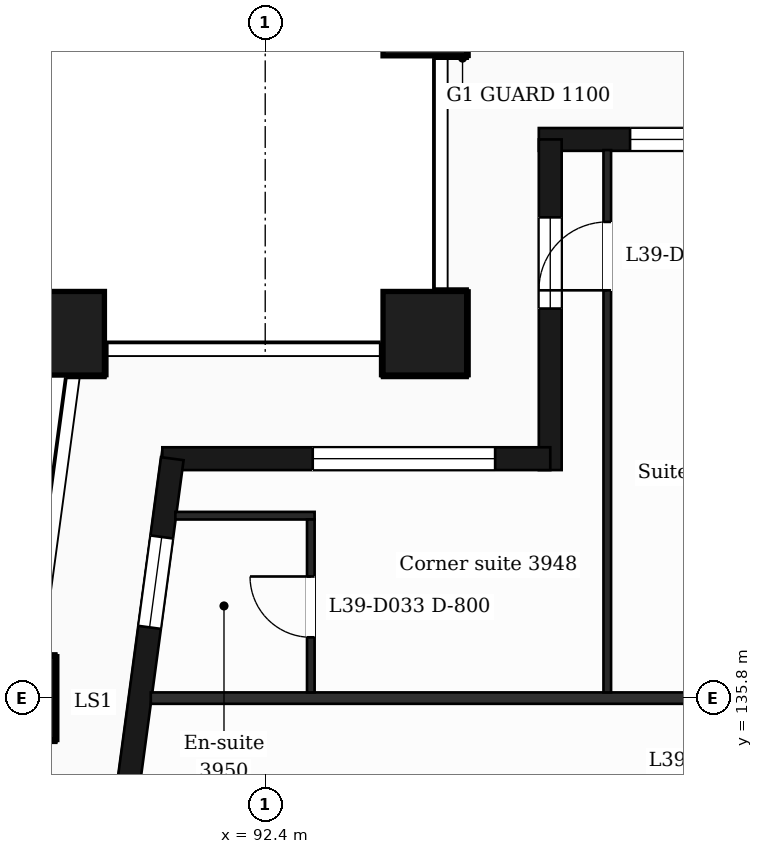
"""IFC4 building model, lengths in metres.
Left out: names, types, materials, properties, quantities, classifications, styles, units other than length and angle.
Written with IfcOpenShell. Run it as: python <this file> out.ifc"""

import sys

from ifc_helpers import new_model, si_unit, direction, frame, frame_2d, origin, origin_2d, place, context, subcontext, project, spatial, rectangle, extrude, element, fill, save


model = new_model("IFC4")
c1 = context("Model", 3, precision=1e-05, world=origin(), true_north=direction((0.0, 1.0)))
c2 = subcontext(c1, "Body", "Model", "MODEL_VIEW")
j1 = project(units=[si_unit("LENGTHUNIT", "METRE"), si_unit("PLANEANGLEUNIT", "RADIAN")], contexts=[c1])
p1 = place(None, origin())
s1 = spatial("IfcSite", under=j1, at=p1, CompositionType="ELEMENT")
p2 = place(p1, origin())
s2 = spatial("IfcBuilding", under=s1, at=p2, CompositionType="ELEMENT")
p3 = place(p2, frame((0.0, 0.0, 166.3)))
s3 = spatial("IfcBuildingStorey", under=s2, at=p3, CompositionType="ELEMENT", Elevation=166.3)
for number, where, z_axis, x_axis in (
    (1, (94.5, 140.6, 0.0), (0.0, 0.0, 1.0), (1.0, 0.0, 0.0)),
    (2, (89.735, 140.6, 0.0), (0.0, 0.0, 1.0), (1.0, 0.0, 0.0)),
    (3, (89.088, 135.8, 0.0), (0.0, 0.0, 1.0), (1.0, 0.0, 0.0)),
    (4, (94.5, 144.8, 0.0), (0.0, 0.0, 1.0), (1.0, 0.0, 0.0)),
):
    element("IfcColumn", number, at=place(p3, frame(where, z_axis=z_axis, x_axis=x_axis)), inside=s3, PredefinedType="COLUMN", context=c2, shape_type="SweptSolid", body=[
        extrude(rectangle(XDim=1.1, YDim=1.1, at=origin_2d()), origin(), (0.0, 0.0, 1.0), 3.7),
    ])
p4 = place(p3, frame((112.5, 143.15, 0.0), z_axis=(0.0, 0.0, 1.0), x_axis=(-1.0, 0.0, 0.0)))
e5 = element("IfcWall", 5, at=p4, inside=s3, PredefinedType="SOLIDWALL", context=c2, shape_type="SweptSolid", body=[
    extrude(rectangle(XDim=16.5, YDim=0.3, at=frame_2d((8.25, 0.0))), origin(), (0.0, 0.0, 1.0), 3.38),
])
p5 = place(p4, frame((1.1, 0.0, 0.9)))
e6 = element("IfcOpeningElement", 6, at=p5, cuts=e5, PredefinedType="OPENING", context=c2, shape_type="SweptSolid", body=[
    extrude(rectangle(XDim=1.2, YDim=2.1, at=frame_2d((0.6, 1.05))), frame((0.0, 0.16, 0.0), z_axis=(0.0, -1.0, 0.0), x_axis=(1.0, 0.0, 0.0)), (0.0, 0.0, 1.0), 0.32),
])
p6 = place(p4, frame((4.2, 0.0, 0.9)))
e7 = element("IfcOpeningElement", 7, at=p6, cuts=e5, PredefinedType="OPENING", context=c2, shape_type="SweptSolid", body=[
    extrude(rectangle(XDim=2.4, YDim=2.1, at=frame_2d((1.2, 1.05))), frame((0.0, 0.16, 0.0), z_axis=(0.0, -1.0, 0.0), x_axis=(1.0, 0.0, 0.0)), (0.0, 0.0, 1.0), 0.32),
])
p7 = place(p4, frame((8.4, 0.0, 0.9)))
e8 = element("IfcOpeningElement", 8, at=p7, cuts=e5, PredefinedType="OPENING", context=c2, shape_type="SweptSolid", body=[
    extrude(rectangle(XDim=2.4, YDim=2.1, at=frame_2d((1.2, 1.05))), frame((0.0, 0.16, 0.0), z_axis=(0.0, -1.0, 0.0), x_axis=(1.0, 0.0, 0.0)), (0.0, 0.0, 1.0), 0.32),
])
p8 = place(p4, frame((12.3, 0.0, 0.0)))
e9 = element("IfcOpeningElement", 9, at=p8, cuts=e5, PredefinedType="OPENING", context=c2, shape_type="SweptSolid", body=[
    extrude(rectangle(XDim=1.2, YDim=2.4, at=frame_2d((0.6, 1.2))), frame((0.0, 0.16, 0.0), z_axis=(0.0, -1.0, 0.0), x_axis=(1.0, 0.0, 0.0)), (0.0, 0.0, 1.0), 0.32),
])
p9 = place(p4, frame((14.1, 0.0, 0.9)))
e10 = element("IfcOpeningElement", 10, at=p9, cuts=e5, PredefinedType="OPENING", context=c2, shape_type="SweptSolid", body=[
    extrude(rectangle(XDim=1.2, YDim=2.1, at=frame_2d((0.6, 1.05))), frame((0.0, 0.16, 0.0), z_axis=(0.0, -1.0, 0.0), x_axis=(1.0, 0.0, 0.0)), (0.0, 0.0, 1.0), 0.32),
])
p10 = place(p3, frame((96.15, 143.15, 0.0), z_axis=(0.0, 0.0, 1.0), x_axis=(0.0, -1.0, 0.0)))
e11 = element("IfcWall", 11, at=p10, inside=s3, PredefinedType="SOLIDWALL", context=c2, shape_type="SweptSolid", body=[
    extrude(rectangle(XDim=4.35, YDim=0.3, at=frame_2d((2.175, 0.0))), origin(), (0.0, 0.0, 1.0), 3.38),
])
p11 = place(p10, frame((1.025, 0.0, 0.9)))
e12 = element("IfcOpeningElement", 12, at=p11, cuts=e11, PredefinedType="OPENING", context=c2, shape_type="SweptSolid", body=[
    extrude(rectangle(XDim=1.2, YDim=2.1, at=frame_2d((0.6, 1.05))), frame((0.0, 0.16, 0.0), z_axis=(0.0, -1.0, 0.0), x_axis=(1.0, 0.0, 0.0)), (0.0, 0.0, 1.0), 0.32),
])
p12 = place(p3, frame((96.15, 138.95, 0.0), z_axis=(0.0, 0.0, 1.0), x_axis=(-1.0, 0.0, 0.0)))
e13 = element("IfcWall", 13, at=p12, inside=s3, PredefinedType="SOLIDWALL", context=c2, shape_type="SweptSolid", body=[
    extrude(rectangle(XDim=5.104, YDim=0.3, at=frame_2d((2.552, 0.0))), origin(), (0.0, 0.0, 1.0), 3.38),
])
p13 = place(p12, frame((0.725, 0.0, 0.9)))
e14 = element("IfcOpeningElement", 14, at=p13, cuts=e13, PredefinedType="OPENING", context=c2, shape_type="SweptSolid", body=[
    extrude(rectangle(XDim=2.4, YDim=2.1, at=frame_2d((1.2, 1.05))), frame((0.0, 0.16, 0.0), z_axis=(0.0, -1.0, 0.0), x_axis=(1.0, 0.0, 0.0)), (0.0, 0.0, 1.0), 0.32),
])
p14 = place(p3, frame((91.177, 138.95, 0.0), z_axis=(0.0, 0.0, 1.0), x_axis=(-0.133426664613, -0.991058689065, 0.0)))
e15 = element("IfcWall", 15, at=p14, inside=s3, PredefinedType="SOLIDWALL", context=c2, shape_type="SweptSolid", body=[
    extrude(rectangle(XDim=6.609, YDim=0.3, at=frame_2d((3.305, 0.0))), origin(), (0.0, 0.0, 1.0), 3.38),
])
p15 = place(p14, frame((1.039, 0.0, 0.9)))
e16 = element("IfcOpeningElement", 16, at=p15, cuts=e15, PredefinedType="OPENING", context=c2, shape_type="SweptSolid", body=[
    extrude(rectangle(XDim=1.2, YDim=2.1, at=frame_2d((0.6, 1.05))), frame((0.0, 0.16, 0.0), z_axis=(0.0, -1.0, 0.0), x_axis=(1.0, 0.0, 0.0)), (0.0, 0.0, 1.0), 0.32),
])
p16 = place(p14, frame((4.294, 0.0, 0.0)))
e17 = element("IfcOpeningElement", 17, at=p16, cuts=e15, PredefinedType="OPENING", context=c2, shape_type="SweptSolid", body=[
    extrude(rectangle(XDim=1.2, YDim=2.4, at=frame_2d((0.6, 1.2))), frame((0.0, 0.16, 0.0), z_axis=(0.0, -1.0, 0.0), x_axis=(1.0, 0.0, 0.0)), (0.0, 0.0, 1.0), 0.32),
])
p17 = place(p3, frame((90.895, 135.8, 0.0), z_axis=(0.0, 0.0, 1.0), x_axis=(1.0, 0.0, 0.0)))
e18 = element("IfcWall", 18, at=p17, inside=s3, PredefinedType="PARTITIONING", context=c2, shape_type="SweptSolid", body=[
    extrude(rectangle(XDim=45.011, YDim=0.15, at=frame_2d((22.505, 0.0))), origin(), (0.0, 0.0, 1.0), 3.38),
])
p18 = place(p17, frame((7.675, 0.0, 0.0)))
e19 = element("IfcOpeningElement", 19, at=p18, cuts=e18, PredefinedType="OPENING", context=c2, shape_type="SweptSolid", body=[
    extrude(rectangle(XDim=1.0, YDim=2.1, at=frame_2d((0.5, 1.05))), frame((0.0, 0.085, 0.0), z_axis=(0.0, -1.0, 0.0), x_axis=(1.0, 0.0, 0.0)), (0.0, 0.0, 1.0), 0.17),
])
p19 = place(p17, frame((11.505, 0.0, 0.0)))
e20 = element("IfcOpeningElement", 20, at=p19, cuts=e18, PredefinedType="OPENING", context=c2, shape_type="SweptSolid", body=[
    extrude(rectangle(XDim=1.0, YDim=2.1, at=frame_2d((0.5, 1.05))), frame((0.0, 0.085, 0.0), z_axis=(0.0, -1.0, 0.0), x_axis=(1.0, 0.0, 0.0)), (0.0, 0.0, 1.0), 0.17),
])
p20 = place(p17, frame((24.865, 0.0, 0.0)))
e21 = element("IfcOpeningElement", 21, at=p20, cuts=e18, PredefinedType="OPENING", context=c2, shape_type="SweptSolid", body=[
    extrude(rectangle(XDim=1.0, YDim=2.1, at=frame_2d((0.5, 1.05))), frame((0.0, 0.085, 0.0), z_axis=(0.0, -1.0, 0.0), x_axis=(1.0, 0.0, 0.0)), (0.0, 0.0, 1.0), 0.17),
])
p21 = place(p17, frame((31.18, 0.0, 0.0)))
e22 = element("IfcOpeningElement", 22, at=p21, cuts=e18, PredefinedType="OPENING", context=c2, shape_type="SweptSolid", body=[
    extrude(rectangle(XDim=0.95, YDim=2.1, at=frame_2d((0.475, 1.05))), frame((0.0, 0.085, 0.0), z_axis=(0.0, -1.0, 0.0), x_axis=(1.0, 0.0, 0.0)), (0.0, 0.0, 1.0), 0.17),
])
p22 = place(p17, frame((36.335, 0.0, 0.0)))
e23 = element("IfcOpeningElement", 23, at=p22, cuts=e18, PredefinedType="OPENING", context=c2, shape_type="SweptSolid", body=[
    extrude(rectangle(XDim=1.0, YDim=2.1, at=frame_2d((0.5, 1.05))), frame((0.0, 0.085, 0.0), z_axis=(0.0, -1.0, 0.0), x_axis=(1.0, 0.0, 0.0)), (0.0, 0.0, 1.0), 0.17),
])
p23 = place(p3, frame((91.218, 138.2, 0.0), z_axis=(0.0, 0.0, 1.0), x_axis=(1.0, 0.0, 0.0)))
e24 = element("IfcWall", 24, at=p23, inside=s3, PredefinedType="PARTITIONING", context=c2, shape_type="SweptSolid", body=[
    extrude(rectangle(XDim=1.832, YDim=0.1, at=frame_2d((0.916, 0.0))), origin(), (0.0, 0.0, 1.0), 3.38),
])
p24 = place(p3, frame((93.0, 135.875, 0.0), z_axis=(0.0, 0.0, 1.0), x_axis=(0.0, 1.0, 0.0)))
e25 = element("IfcWall", 25, at=p24, inside=s3, PredefinedType="PARTITIONING", context=c2, shape_type="SweptSolid", body=[
    extrude(rectangle(XDim=2.275, YDim=0.1, at=frame_2d((1.137, 0.0))), origin(), (0.0, 0.0, 1.0), 3.38),
])
p25 = place(p24, frame((0.725, 0.0, 0.0)))
e26 = element("IfcOpeningElement", 26, at=p25, cuts=e25, PredefinedType="OPENING", context=c2, shape_type="SweptSolid", body=[
    extrude(rectangle(XDim=0.8, YDim=2.1, at=frame_2d((0.4, 1.05))), frame((0.0, 0.06, 0.0), z_axis=(0.0, -1.0, 0.0), x_axis=(1.0, 0.0, 0.0)), (0.0, 0.0, 1.0), 0.12),
])
p26 = place(p3, frame((96.9, 135.875, 0.0), z_axis=(0.0, 0.0, 1.0), x_axis=(0.0, 1.0, 0.0)))
e27 = element("IfcWall", 27, at=p26, inside=s3, PredefinedType="PARTITIONING", context=c2, shape_type="SweptSolid", body=[
    extrude(rectangle(XDim=7.135, YDim=0.1, at=frame_2d((3.567, 0.0))), origin(), (0.0, 0.0, 1.0), 3.38),
])
p27 = place(p26, frame((5.29, 0.0, 0.0)))
e28 = element("IfcOpeningElement", 28, at=p27, cuts=e27, PredefinedType="OPENING", context=c2, shape_type="SweptSolid", body=[
    extrude(rectangle(XDim=0.9, YDim=2.1, at=frame_2d((0.45, 1.05))), frame((0.0, 0.06, 0.0), z_axis=(0.0, -1.0, 0.0), x_axis=(1.0, 0.0, 0.0)), (0.0, 0.0, 1.0), 0.12),
])
p28 = place(p9, origin())
e29 = element("IfcWindow", 29, at=p28, inside=s3, PartitioningType="SINGLE_PANEL", PredefinedType="WINDOW", context=c2, shape_type="SweptSolid", body=[
    extrude(rectangle(XDim=1.2, YDim=2.1, at=frame_2d((0.6, 1.05))), frame((0.0, 0.03, 0.0), z_axis=(0.0, -1.0, 0.0), x_axis=(1.0, 0.0, 0.0)), (0.0, 0.0, 1.0), 0.06),
])
fill(e10, e29)
p29 = place(p11, origin())
e30 = element("IfcWindow", 30, at=p29, inside=s3, PartitioningType="SINGLE_PANEL", PredefinedType="WINDOW", context=c2, shape_type="SweptSolid", body=[
    extrude(rectangle(XDim=1.2, YDim=2.1, at=frame_2d((0.6, 1.05))), frame((0.0, 0.03, 0.0), z_axis=(0.0, -1.0, 0.0), x_axis=(1.0, 0.0, 0.0)), (0.0, 0.0, 1.0), 0.06),
])
fill(e12, e30)
p30 = place(p13, origin())
e31 = element("IfcWindow", 31, at=p30, inside=s3, PartitioningType="SINGLE_PANEL", PredefinedType="WINDOW", context=c2, shape_type="SweptSolid", body=[
    extrude(rectangle(XDim=2.4, YDim=2.1, at=frame_2d((1.2, 1.05))), frame((0.0, 0.03, 0.0), z_axis=(0.0, -1.0, 0.0), x_axis=(1.0, 0.0, 0.0)), (0.0, 0.0, 1.0), 0.06),
])
fill(e14, e31)
p31 = place(p15, origin())
e32 = element("IfcWindow", 32, at=p31, inside=s3, PartitioningType="SINGLE_PANEL", PredefinedType="WINDOW", context=c2, shape_type="SweptSolid", body=[
    extrude(rectangle(XDim=1.2, YDim=2.1, at=frame_2d((0.6, 1.05))), frame((0.0, 0.03, 0.0), z_axis=(0.0, -1.0, 0.0), x_axis=(1.0, 0.0, 0.0)), (0.0, 0.0, 1.0), 0.06),
])
fill(e16, e32)
p32 = place(p27, origin())
e33 = element("IfcDoor", 33, at=p32, inside=s3, OperationType="SINGLE_SWING_LEFT", PredefinedType="DOOR", context=c2, shape_type="SweptSolid", body=[
    extrude(rectangle(XDim=0.9, YDim=2.1, at=frame_2d((0.45, 1.05))), frame((0.0, 0.025, 0.0), z_axis=(0.0, -1.0, 0.0), x_axis=(1.0, 0.0, 0.0)), (0.0, 0.0, 1.0), 0.05),
])
fill(e28, e33)
p33 = place(p25, origin())
e34 = element("IfcDoor", 34, at=p33, inside=s3, OperationType="SINGLE_SWING_RIGHT", PredefinedType="DOOR", context=c2, shape_type="SweptSolid", body=[
    extrude(rectangle(XDim=0.8, YDim=2.1, at=frame_2d((0.4, 1.05))), frame((0.0, 0.025, 0.0), z_axis=(0.0, -1.0, 0.0), x_axis=(1.0, 0.0, 0.0)), (0.0, 0.0, 1.0), 0.05),
])
fill(e26, e34)
save(model, sys.argv[1])
